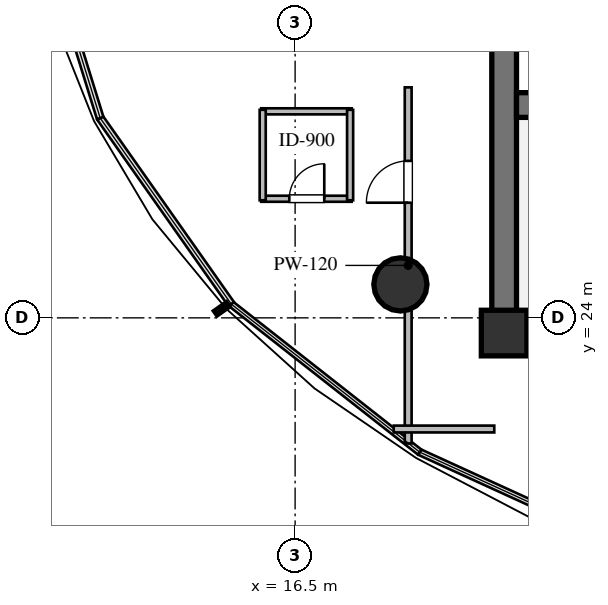
"""IFC4 building model, lengths in metres.
Left out: names, types, materials, properties, quantities, classifications, styles, units other than length and angle.
Written with IfcOpenShell. Run it as: python <this file> out.ifc"""

import sys

from ifc_helpers import new_model, si_unit, direction, frame, frame_2d, origin, origin_2d, place, context, subcontext, project, spatial, rectangle, circle, extrude, element, fill, save


model = new_model("IFC4")
c1 = context("Model", 3, precision=1e-05, world=origin(), true_north=direction((0.0, 1.0)))
c2 = subcontext(c1, "Body", "Model", "MODEL_VIEW")
j1 = project(units=[si_unit("LENGTHUNIT", "METRE"), si_unit("PLANEANGLEUNIT", "RADIAN")], contexts=[c1])
p1 = place(None, origin())
s1 = spatial("IfcSite", under=j1, at=p1, CompositionType="ELEMENT")
p2 = place(p1, origin())
s2 = spatial("IfcBuilding", under=s1, at=p2, CompositionType="ELEMENT")
p3 = place(p2, frame((0.0, 0.0, 60.0)))
s3 = spatial("IfcBuildingStorey", under=s2, at=p3, CompositionType="ELEMENT", Elevation=60.0)
p4 = place(p3, frame((21.675, 23.6, 0.0), z_axis=(0.0, 0.0, 1.0), x_axis=(1.0, 0.0, 0.0)))
e1 = element("IfcWall", 1, at=p4, inside=s3, PredefinedType="SHEAR", context=c2, shape_type="SweptSolid", body=[
    extrude(rectangle(XDim=22.65, YDim=0.65, at=frame_2d((11.325, 0.0))), origin(), (0.0, 0.0, 1.0), 3.36),
])
p5 = place(p3, frame((22.0, 23.925, 0.0), z_axis=(0.0, 0.0, 1.0), x_axis=(0.0, 1.0, 0.0)))
e2 = element("IfcWall", 2, at=p5, inside=s3, PredefinedType="SHEAR", context=c2, shape_type="SweptSolid", body=[
    extrude(rectangle(XDim=12.15, YDim=0.65, at=frame_2d((6.075, 0.0))), origin(), (0.0, 0.0, 1.0), 3.36),
])
p6 = place(p3, frame((22.325, 29.6, 0.0), z_axis=(0.0, 0.0, 1.0), x_axis=(1.0, 0.0, 0.0)))
e3 = element("IfcWall", 3, at=p6, inside=s3, PredefinedType="SHEAR", context=c2, shape_type="SweptSolid", body=[
    extrude(rectangle(XDim=21.35, YDim=0.65, at=frame_2d((10.675, 0.0))), origin(), (0.0, 0.0, 1.0), 3.36),
])
p7 = place(p6, frame((12.125, 0.0, 0.0)))
e4 = element("IfcOpeningElement", 4, at=p7, cuts=e3, PredefinedType="OPENING", context=c2, shape_type="SweptSolid", body=[
    extrude(rectangle(XDim=1.15, YDim=2.1, at=frame_2d((0.575, 1.05))), frame((0.0, 0.335, 0.0), z_axis=(0.0, -1.0, 0.0), x_axis=(1.0, 0.0, 0.0)), (0.0, 0.0, 1.0), 0.67),
])
p8 = place(p3, frame((22.0, 23.6, 0.0), z_axis=(0.0, 0.0, 1.0), x_axis=(1.0, 0.0, 0.0)))
e5 = element("IfcColumn", 5, at=p8, inside=s3, PredefinedType="COLUMN", context=c2, shape_type="SweptSolid", body=[
    extrude(rectangle(XDim=1.2, YDim=1.2, at=origin_2d()), origin(), (0.0, 0.0, 1.0), 3.6),
])
p9 = place(p3, frame((19.27, 24.88, 0.0), z_axis=(0.0, 0.0, 1.0), x_axis=(1.0, 0.0, 0.0)))
e6 = element("IfcColumn", 6, at=p9, inside=s3, PredefinedType="COLUMN", context=c2, shape_type="SweptSolid", body=[
    extrude(circle(Radius=0.7, at=origin_2d()), origin(), (0.0, 0.0, 1.0), 3.6),
])
p10 = place(p3, frame((15.607, 27.134, 0.0), z_axis=(0.0, 0.0, 1.0), x_axis=(1.0, 0.0, 0.0)))
e7 = element("IfcWall", 7, at=p10, inside=s3, PredefinedType="PLUMBINGWALL", context=c2, shape_type="SweptSolid", body=[
    extrude(rectangle(XDim=2.38, YDim=0.16, at=frame_2d((1.19, 0.0))), origin(), (0.0, 0.0, 1.0), 3.36),
])
p11 = place(p10, frame((0.74, 0.0, 0.0)))
e8 = element("IfcOpeningElement", 8, at=p11, cuts=e7, PredefinedType="OPENING", context=c2, shape_type="SweptSolid", body=[
    extrude(rectangle(XDim=0.92, YDim=2.1, at=frame_2d((0.46, 1.05))), frame((0.0, 0.09, 0.0), z_axis=(0.0, -1.0, 0.0), x_axis=(1.0, 0.0, 0.0)), (0.0, 0.0, 1.0), 0.18),
])
for number, where, z_axis, x_axis in (
    (9, (15.607, 29.434, 0.0), (0.0, 0.0, 1.0), (1.0, 0.0, 0.0)),
    (10, (15.647, 27.094, 0.0), (0.0, 0.0, 1.0), (0.0, 1.0, 0.0)),
):
    element("IfcWall", number, at=place(p3, frame(where, z_axis=z_axis, x_axis=x_axis)), inside=s3, PredefinedType="PLUMBINGWALL", context=c2, shape_type="SweptSolid", body=[
        extrude(rectangle(XDim=2.38, YDim=0.16, at=frame_2d((1.19, 0.0))), origin(), (0.0, 0.0, 1.0), 3.36),
    ])
p12 = place(p3, frame((17.947, 27.094, 0.0), z_axis=(0.0, 0.0, 1.0), x_axis=(0.0, 1.0, 0.0)))
e11 = element("IfcWall", 11, at=p12, inside=s3, PredefinedType="PLUMBINGWALL", context=c2, shape_type="SweptSolid", body=[
    extrude(rectangle(XDim=2.38, YDim=0.16, at=frame_2d((1.19, 0.0))), origin(), (0.0, 0.0, 1.0), 2.738),
])
p13 = place(p3, frame((19.475, 20.695, 0.0), z_axis=(0.0, 0.0, 1.0), x_axis=(0.0, 1.0, 0.0)))
e12 = element("IfcWall", 12, at=p13, inside=s3, PredefinedType="PARTITIONING", context=c2, shape_type="SweptSolid", body=[
    extrude(rectangle(XDim=9.37, YDim=0.18, at=frame_2d((4.685, 0.0))), origin(), (0.0, 0.0, 1.0), 2.738),
])
p14 = place(p13, frame((6.335, 0.0, 0.0)))
e13 = element("IfcOpeningElement", 13, at=p14, cuts=e12, PredefinedType="OPENING", context=c2, shape_type="SweptSolid", body=[
    extrude(rectangle(XDim=1.1, YDim=2.1, at=frame_2d((0.55, 1.05))), frame((0.0, 0.1, 0.0), z_axis=(0.0, -1.0, 0.0), x_axis=(1.0, 0.0, 0.0)), (0.0, 0.0, 1.0), 0.2),
])
p15 = place(p3, frame((21.74, 21.075, 0.0), z_axis=(0.0, 0.0, 1.0), x_axis=(-1.0, 0.0, 0.0)))
e14 = element("IfcWall", 14, at=p15, inside=s3, PredefinedType="PARTITIONING", context=c2, shape_type="SweptSolid", body=[
    extrude(rectangle(XDim=2.645, YDim=0.18, at=frame_2d((1.323, 0.0))), origin(), (0.0, 0.0, 1.0), 3.36),
])
p16 = place(p11, origin())
e15 = element("IfcDoor", 15, at=p16, inside=s3, OperationType="SINGLE_SWING_RIGHT", PredefinedType="DOOR", context=c2, shape_type="SweptSolid", body=[
    extrude(rectangle(XDim=0.92, YDim=2.1, at=frame_2d((0.46, 1.05))), frame((0.0, 0.025, 0.0), z_axis=(0.0, -1.0, 0.0), x_axis=(1.0, 0.0, 0.0)), (0.0, 0.0, 1.0), 0.05),
])
fill(e8, e15)
p17 = place(p14, origin())
e16 = element("IfcDoor", 16, at=p17, inside=s3, OperationType="SINGLE_SWING_LEFT", PredefinedType="DOOR", context=c2, shape_type="SweptSolid", body=[
    extrude(rectangle(XDim=1.1, YDim=2.1, at=frame_2d((0.55, 1.05))), frame((0.0, 0.025, 0.0), z_axis=(0.0, -1.0, 0.0), x_axis=(1.0, 0.0, 0.0)), (0.0, 0.0, 1.0), 0.05),
])
fill(e13, e16)
save(model, sys.argv[1])
